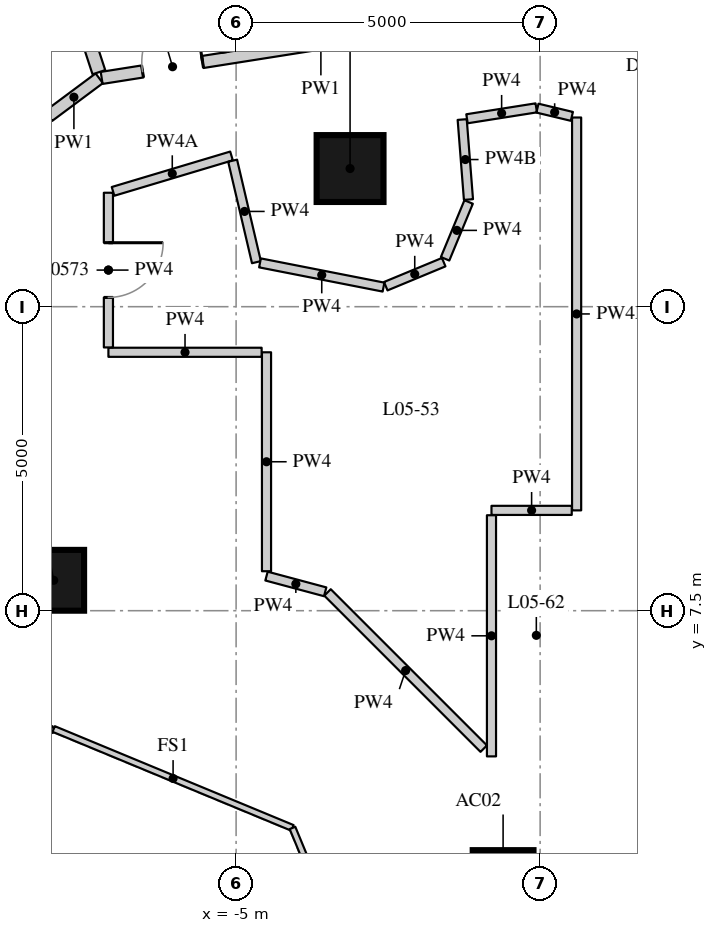
"""IFC4 building model, lengths in metres.
Left out: names, types, materials, properties, quantities, classifications, styles, units other than length and angle.
Written with IfcOpenShell. Run it as: python <this file> out.ifc"""

import sys

from ifc_helpers import new_model, si_unit, direction, frame, frame_2d, origin, origin_2d, place, context, subcontext, project, spatial, rectangle, extrude, element, fill, save


model = new_model("IFC4")
c1 = context("Model", 3, precision=1e-05, world=origin(), true_north=direction((0.0, 1.0)))
c2 = subcontext(c1, "Body", "Model", "MODEL_VIEW")
j1 = project(units=[si_unit("LENGTHUNIT", "METRE"), si_unit("PLANEANGLEUNIT", "RADIAN")], contexts=[c1])
p1 = place(None, origin())
s1 = spatial("IfcSite", under=j1, at=p1, CompositionType="ELEMENT")
p2 = place(p1, origin())
s2 = spatial("IfcBuilding", under=s1, at=p2, CompositionType="ELEMENT")
p3 = place(p2, frame((0.0, 0.0, 25.0)))
s3 = spatial("IfcBuildingStorey", under=s2, at=p3, CompositionType="ELEMENT", Elevation=25.0)
for number, where, z_axis, x_axis in (
    (1, (-0.609, 3.062, 0.0), (0.0, 0.0, 1.0), (1.0, 0.0, 0.0)),
    (2, (-8.0, 8.0, 0.0), (0.0, 0.0, 1.0), (1.0, 0.0, 0.0)),
):
    element("IfcColumn", number, at=place(p3, frame(where, z_axis=z_axis, x_axis=x_axis)), inside=s3, PredefinedType="COLUMN", context=c2, shape_type="SweptSolid", body=[
        extrude(rectangle(XDim=1.0, YDim=1.0, at=origin_2d()), origin(), (0.0, 0.0, 1.0), 3.3),
    ])
p4 = place(p3, frame((-3.126, 14.772, 0.0), z_axis=(0.0, 0.0, 1.0), x_axis=(1.0, 0.0, 0.0)))
e3 = element("IfcColumn", 3, at=p4, inside=s3, PredefinedType="COLUMN", context=c2, shape_type="SweptSolid", body=[
    extrude(rectangle(XDim=1.1, YDim=1.1, at=origin_2d()), origin(), (0.0, 0.0, 1.0), 3.3),
])
p5 = place(p3, frame((-8.084, 15.636, 0.0), z_axis=(0.0, 0.0, 1.0), x_axis=(0.802193962144, 0.597063520155, 0.0)))
e4 = element("IfcWall", 4, at=p5, inside=s3, PredefinedType="PARTITIONING", context=c2, shape_type="SweptSolid", body=[
    extrude(rectangle(XDim=1.039, YDim=0.2, at=frame_2d((0.52, 0.0))), origin(), (0.0, 0.0, 1.0), 3.02),
])
p6 = place(p3, frame((-7.211, 16.263, 0.0), z_axis=(0.0, 0.0, 1.0), x_axis=(0.987792503573, 0.155775382796, 0.0)))
e5 = element("IfcWall", 5, at=p6, inside=s3, PredefinedType="PARTITIONING", context=c2, shape_type="SweptSolid", body=[
    extrude(rectangle(XDim=7.3, YDim=0.2, at=frame_2d((3.65, 0.0))), origin(), (0.0, 0.0, 1.0), 3.02),
])
p7 = place(p6, frame((5.581, 0.0, 0.0)))
e6 = element("IfcOpeningElement", 6, at=p7, cuts=e5, PredefinedType="OPENING", context=c2, shape_type="SweptSolid", body=[
    extrude(rectangle(XDim=1.0, YDim=2.1, at=frame_2d((0.5, 1.05))), frame((0.0, 0.11, 0.0), z_axis=(0.0, -1.0, 0.0), x_axis=(1.0, 0.0, 0.0)), (0.0, 0.0, 1.0), 0.22),
])
p8 = place(p6, frame((0.68, 0.0, 0.0)))
e7 = element("IfcOpeningElement", 7, at=p8, cuts=e5, PredefinedType="OPENING", context=c2, shape_type="SweptSolid", body=[
    extrude(rectangle(XDim=1.0, YDim=2.1, at=frame_2d((0.5, 1.05))), frame((0.0, 0.11, 0.0), z_axis=(0.0, -1.0, 0.0), x_axis=(1.0, 0.0, 0.0)), (0.0, 0.0, 1.0), 0.22),
])
p9 = place(p3, frame((0.098, 17.377, 0.0), z_axis=(0.0, 0.0, 1.0), x_axis=(0.972602241469, -0.232475546864, 0.0)))
e8 = element("IfcWall", 8, at=p9, inside=s3, PredefinedType="PARTITIONING", context=c2, shape_type="SweptSolid", body=[
    extrude(rectangle(XDim=10.743, YDim=0.2, at=frame_2d((5.372, 0.0))), origin(), (0.0, 0.0, 1.0), 3.02),
])
p10 = place(p9, frame((4.242, 0.0, 0.0)))
e9 = element("IfcOpeningElement", 9, at=p10, cuts=e8, PredefinedType="OPENING", context=c2, shape_type="SweptSolid", body=[
    extrude(rectangle(XDim=1.0, YDim=2.1, at=frame_2d((0.5, 1.05))), frame((0.0, 0.11, 0.0), z_axis=(0.0, -1.0, 0.0), x_axis=(1.0, 0.0, 0.0)), (0.0, 0.0, 1.0), 0.22),
])
p11 = place(p9, frame((1.253, 0.0, 0.0)))
e10 = element("IfcOpeningElement", 10, at=p11, cuts=e8, PredefinedType="OPENING", context=c2, shape_type="SweptSolid", body=[
    extrude(rectangle(XDim=0.9, YDim=2.1, at=frame_2d((0.45, 1.05))), frame((0.0, 0.11, 0.0), z_axis=(0.0, -1.0, 0.0), x_axis=(1.0, 0.0, 0.0)), (0.0, 0.0, 1.0), 0.22),
])
p12 = place(p3, frame((0.6, 15.612, 0.0), z_axis=(0.0, 0.0, 1.0), x_axis=(0.0, -1.0, 0.0)))
e11 = element("IfcWall", 11, at=p12, inside=s3, PredefinedType="PARTITIONING", context=c2, shape_type="SweptSolid", body=[
    extrude(rectangle(XDim=6.462, YDim=0.15, at=frame_2d((3.231, 0.0))), origin(), (0.0, 0.0, 1.0), 2.47),
])
p13 = place(p3, frame((0.52, 9.15, 0.0), z_axis=(0.0, 0.0, 1.0), x_axis=(-1.0, 0.0, 0.0)))
e12 = element("IfcWall", 12, at=p13, inside=s3, PredefinedType="PARTITIONING", context=c2, shape_type="SweptSolid", body=[
    extrude(rectangle(XDim=1.32, YDim=0.15, at=frame_2d((0.66, 0.0))), origin(), (0.0, 0.0, 1.0), 3.02),
])
p14 = place(p3, frame((-0.8, 9.07, 0.0), z_axis=(0.0, 0.0, 1.0), x_axis=(0.0, -1.0, 0.0)))
e13 = element("IfcWall", 13, at=p14, inside=s3, PredefinedType="PARTITIONING", context=c2, shape_type="SweptSolid", body=[
    extrude(rectangle(XDim=3.966, YDim=0.15, at=frame_2d((1.983, 0.0))), origin(), (0.0, 0.0, 1.0), 3.02),
])
p15 = place(p3, frame((-0.927, 5.231, 0.0), z_axis=(0.0, 0.0, 1.0), x_axis=(-0.707106781187, 0.707106781187, 0.0)))
e14 = element("IfcWall", 14, at=p15, inside=s3, PredefinedType="PARTITIONING", context=c2, shape_type="SweptSolid", body=[
    extrude(rectangle(XDim=3.633, YDim=0.15, at=frame_2d((1.817, 0.0))), origin(), (0.0, 0.0, 1.0), 3.02),
])
p16 = place(p3, frame((-3.535, 7.811, 0.0), z_axis=(0.0, 0.0, 1.0), x_axis=(-0.965921867197, 0.258833820183, 0.0)))
e15 = element("IfcWall", 15, at=p16, inside=s3, PredefinedType="PARTITIONING", context=c2, shape_type="SweptSolid", body=[
    extrude(rectangle(XDim=0.999, YDim=0.15, at=frame_2d((0.5, 0.0))), origin(), (0.0, 0.0, 1.0), 3.02),
])
p17 = place(p3, frame((-4.5, 8.149, 0.0), z_axis=(0.0, 0.0, 1.0), x_axis=(0.0, 1.0, 0.0)))
e16 = element("IfcWall", 16, at=p17, inside=s3, PredefinedType="PARTITIONING", context=c2, shape_type="SweptSolid", body=[
    extrude(rectangle(XDim=3.601, YDim=0.15, at=frame_2d((1.8, 0.0))), origin(), (0.0, 0.0, 1.0), 3.02),
])
p18 = place(p3, frame((-4.58, 11.75, 0.0), z_axis=(0.0, 0.0, 1.0), x_axis=(-1.0, 0.0, 0.0)))
e17 = element("IfcWall", 17, at=p18, inside=s3, PredefinedType="PARTITIONING", context=c2, shape_type="SweptSolid", body=[
    extrude(rectangle(XDim=2.52, YDim=0.15, at=frame_2d((1.26, 0.0))), origin(), (0.0, 0.0, 1.0), 3.02),
])
p19 = place(p3, frame((-7.1, 11.83, 0.0), z_axis=(0.0, 0.0, 1.0), x_axis=(0.0, 1.0, 0.0)))
e18 = element("IfcWall", 18, at=p19, inside=s3, PredefinedType="PARTITIONING", context=c2, shape_type="SweptSolid", body=[
    extrude(rectangle(XDim=2.544, YDim=0.15, at=frame_2d((1.272, 0.0))), origin(), (0.0, 0.0, 1.0), 3.02),
])
p20 = place(p19, frame((0.822, 0.0, 0.0)))
e19 = element("IfcOpeningElement", 19, at=p20, cuts=e18, PredefinedType="OPENING", context=c2, shape_type="SweptSolid", body=[
    extrude(rectangle(XDim=0.9, YDim=2.1, at=frame_2d((0.45, 1.05))), frame((0.0, 0.085, 0.0), z_axis=(0.0, -1.0, 0.0), x_axis=(1.0, 0.0, 0.0)), (0.0, 0.0, 1.0), 0.17),
])
p21 = place(p3, frame((-7.024, 14.396, 0.0), z_axis=(0.0, 0.0, 1.0), x_axis=(0.958024310194, 0.286686974028, 0.0)))
e20 = element("IfcWall", 20, at=p21, inside=s3, PredefinedType="PARTITIONING", context=c2, shape_type="SweptSolid", body=[
    extrude(rectangle(XDim=2.034, YDim=0.15, at=frame_2d((1.017, 0.0))), origin(), (0.0, 0.0, 1.0), 2.57),
])
p22 = place(p3, frame((-5.057, 14.901, 0.0), z_axis=(0.0, 0.0, 1.0), x_axis=(0.228269361027, -0.973598017056, 0.0)))
e21 = element("IfcWall", 21, at=p22, inside=s3, PredefinedType="PARTITIONING", context=c2, shape_type="SweptSolid", body=[
    extrude(rectangle(XDim=1.714, YDim=0.15, at=frame_2d((0.857, 0.0))), origin(), (0.0, 0.0, 1.0), 3.02),
])
p23 = place(p3, frame((-4.607, 13.22, 0.0), z_axis=(0.0, 0.0, 1.0), x_axis=(0.981304142817, -0.192463449234, 0.0)))
e22 = element("IfcWall", 22, at=p23, inside=s3, PredefinedType="PARTITIONING", context=c2, shape_type="SweptSolid", body=[
    extrude(rectangle(XDim=2.07, YDim=0.15, at=frame_2d((1.035, 0.0))), origin(), (0.0, 0.0, 1.0), 3.02),
])
p24 = place(p3, frame((-2.539, 12.837, 0.0), z_axis=(0.0, 0.0, 1.0), x_axis=(0.923768662954, 0.382950985565, 0.0)))
e23 = element("IfcWall", 23, at=p24, inside=s3, PredefinedType="PARTITIONING", context=c2, shape_type="SweptSolid", body=[
    extrude(rectangle(XDim=1.031, YDim=0.15, at=frame_2d((0.516, 0.0))), origin(), (0.0, 0.0, 1.0), 3.02),
])
p25 = place(p3, frame((-1.563, 13.288, 0.0), z_axis=(0.0, 0.0, 1.0), x_axis=(0.38284922736, 0.923810840546, 0.0)))
e24 = element("IfcWall", 24, at=p25, inside=s3, PredefinedType="PARTITIONING", context=c2, shape_type="SweptSolid", body=[
    extrude(rectangle(XDim=1.011, YDim=0.15, at=frame_2d((0.506, 0.0))), origin(), (0.0, 0.0, 1.0), 3.02),
])
p26 = place(p3, frame((-1.179, 14.262, 0.0), z_axis=(0.0, 0.0, 1.0), x_axis=(-0.078054271799, 0.996949111366, 0.0)))
e25 = element("IfcWall", 25, at=p26, inside=s3, PredefinedType="PARTITIONING", context=c2, shape_type="SweptSolid", body=[
    extrude(rectangle(XDim=1.32, YDim=0.15, at=frame_2d((0.66, 0.0))), origin(), (0.0, 0.0, 1.0), 2.47),
])
p27 = place(p3, frame((-1.203, 15.591, 0.0), z_axis=(0.0, 0.0, 1.0), x_axis=(0.987814418255, 0.155636355288, 0.0)))
e26 = element("IfcWall", 26, at=p27, inside=s3, PredefinedType="PARTITIONING", context=c2, shape_type="SweptSolid", body=[
    extrude(rectangle(XDim=1.153, YDim=0.15, at=frame_2d((0.577, 0.0))), origin(), (0.0, 0.0, 1.0), 3.02),
])
p28 = place(p3, frame((-0.044, 15.766, 0.0), z_axis=(0.0, 0.0, 1.0), x_axis=(0.972535568527, -0.232754308121, 0.0)))
e27 = element("IfcWall", 27, at=p28, inside=s3, PredefinedType="PARTITIONING", context=c2, shape_type="SweptSolid", body=[
    extrude(rectangle(XDim=0.582, YDim=0.15, at=frame_2d((0.291, 0.0))), origin(), (0.0, 0.0, 1.0), 3.02),
])
p29 = place(p3, frame((-9.429, 23.014, 0.0), z_axis=(0.0, 0.0, 1.0), x_axis=(0.310239117306, -0.950658555998, 0.0)))
e28 = element("IfcWall", 28, at=p29, inside=s3, PredefinedType="PARTITIONING", context=c2, shape_type="SweptSolid", body=[
    extrude(rectangle(XDim=7.003, YDim=0.22, at=frame_2d((3.501, 0.0))), origin(), (0.0, 0.0, 1.0), 3.02),
])
p30 = place(p3, frame((-5.181, 16.684, 0.0), z_axis=(0.0, 0.0, 1.0), x_axis=(-0.156077517275, 0.987744809453, 0.0)))
e29 = element("IfcWall", 29, at=p30, inside=s3, PredefinedType="PARTITIONING", context=c2, shape_type="SweptSolid", body=[
    extrude(rectangle(XDim=2.399, YDim=0.12, at=frame_2d((1.2, 0.0))), origin(), (0.0, 0.0, 1.0), 3.02),
])
for number, where, z_axis, x_axis in (
    (30, (-11.927, 3.927, 0.0), (0.0, 0.0, 1.0), (0.924, 0.383, 0.0)),
    (31, (-8.0, 5.554, 0.0), (0.0, 0.0, 1.0), (0.924, -0.383, 0.0)),
    (32, (-4.073, 3.927, 0.0), (0.0, 0.0, 1.0), (0.383, -0.924, 0.0)),
):
    element("IfcWall", number, at=place(p3, frame(where, z_axis=z_axis, x_axis=x_axis)), inside=s3, PredefinedType="PARTITIONING", context=c2, shape_type="SweptSolid", body=[
        extrude(rectangle(XDim=4.251, YDim=0.1, at=frame_2d((2.125, 0.0))), origin(), (0.0, 0.0, 1.0), 3.02),
    ])
p31 = place(p8, origin())
e33 = element("IfcDoor", 33, at=p31, inside=s3, OperationType="SINGLE_SWING_RIGHT", PredefinedType="DOOR", context=c2, shape_type="SweptSolid", body=[
    extrude(rectangle(XDim=1.0, YDim=2.1, at=frame_2d((0.5, 1.05))), frame((0.0, 0.025, 0.0), z_axis=(0.0, -1.0, 0.0), x_axis=(1.0, 0.0, 0.0)), (0.0, 0.0, 1.0), 0.05),
])
fill(e7, e33)
p32 = place(p20, origin())
e34 = element("IfcDoor", 34, at=p32, inside=s3, OperationType="SINGLE_SWING_LEFT", PredefinedType="DOOR", context=c2, shape_type="SweptSolid", body=[
    extrude(rectangle(XDim=0.9, YDim=2.1, at=frame_2d((0.45, 1.05))), frame((0.0, 0.025, 0.0), z_axis=(0.0, -1.0, 0.0), x_axis=(1.0, 0.0, 0.0)), (0.0, 0.0, 1.0), 0.05),
])
fill(e19, e34)
save(model, sys.argv[1])
